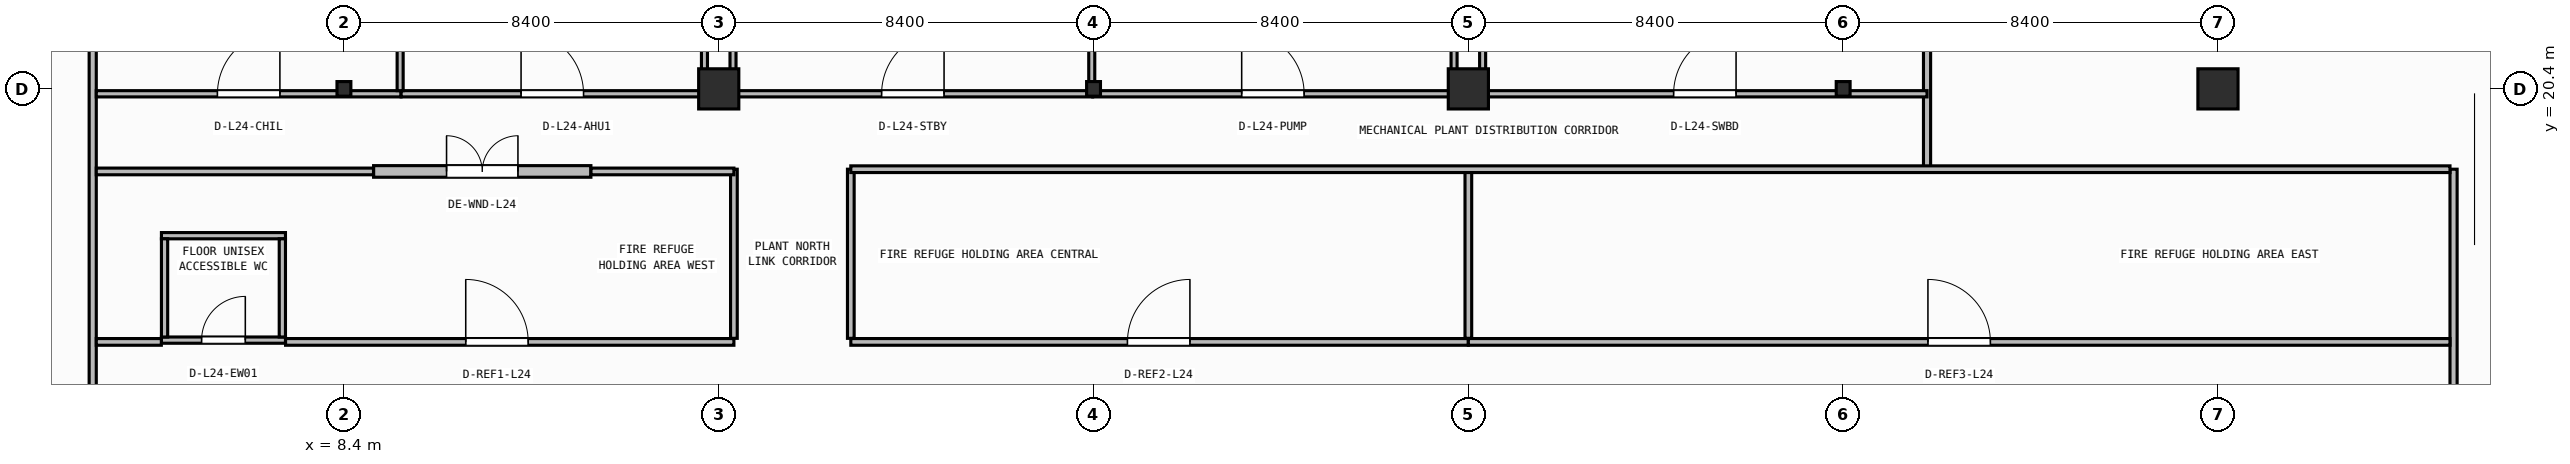
"""IFC4 building model, lengths in metres.
Left out: names, types, materials, properties, quantities, classifications, styles, units other than length and angle.
Written with IfcOpenShell. Run it as: python <this file> out.ifc"""

import sys

from ifc_helpers import new_model, si_unit, direction, frame, frame_2d, origin, origin_2d, place, context, subcontext, project, spatial, rectangle, i_section, extrude, element, fill, save


model = new_model("IFC4")
c1 = context("Model", 3, precision=1e-05, world=origin(), true_north=direction((0.0, 1.0)))
c2 = subcontext(c1, "Body", "Model", "MODEL_VIEW")
j1 = project(units=[si_unit("LENGTHUNIT", "METRE"), si_unit("PLANEANGLEUNIT", "RADIAN")], contexts=[c1])
p1 = place(None, origin())
s1 = spatial("IfcSite", under=j1, at=p1, CompositionType="ELEMENT")
p2 = place(p1, origin())
s2 = spatial("IfcBuilding", under=s1, at=p2, CompositionType="ELEMENT")
p3 = place(p2, frame((0.0, 0.0, 97.55)))
s3 = spatial("IfcBuildingStorey", under=s2, at=p3, CompositionType="ELEMENT", Elevation=97.55)
p4 = place(p3, frame((8.4, 20.4, 0.0), z_axis=(0.0, 0.0, 1.0), x_axis=(1.0, 0.0, 0.0)))
e1 = element("IfcColumn", 1, at=p4, inside=s3, PredefinedType="COLUMN", context=c2, shape_type="SweptSolid", body=[
    extrude(i_section(OverallWidth=0.311, OverallDepth=0.327, WebThickness=0.016, FlangeThickness=0.025, FilletRadius=0.017, at=origin_2d()), origin(), (0.0, 0.0, 1.0), 5.8),
])
p5 = place(p3, frame((16.8, 20.4, 0.0), z_axis=(0.0, 0.0, 1.0), x_axis=(1.0, 0.0, 0.0)))
e2 = element("IfcColumn", 2, at=p5, inside=s3, PredefinedType="COLUMN", context=c2, shape_type="SweptSolid", body=[
    extrude(rectangle(XDim=0.9, YDim=0.9, at=origin_2d()), origin(), (0.0, 0.0, 1.0), 5.8),
])
p6 = place(p3, frame((25.2, 20.4, 0.0), z_axis=(0.0, 0.0, 1.0), x_axis=(1.0, 0.0, 0.0)))
e3 = element("IfcColumn", 3, at=p6, inside=s3, PredefinedType="COLUMN", context=c2, shape_type="SweptSolid", body=[
    extrude(i_section(OverallWidth=0.311, OverallDepth=0.327, WebThickness=0.016, FlangeThickness=0.025, FilletRadius=0.017, at=origin_2d()), origin(), (0.0, 0.0, 1.0), 5.8),
])
p7 = place(p3, frame((33.6, 20.4, 0.0), z_axis=(0.0, 0.0, 1.0), x_axis=(1.0, 0.0, 0.0)))
e4 = element("IfcColumn", 4, at=p7, inside=s3, PredefinedType="COLUMN", context=c2, shape_type="SweptSolid", body=[
    extrude(rectangle(XDim=0.9, YDim=0.9, at=origin_2d()), origin(), (0.0, 0.0, 1.0), 5.8),
])
p8 = place(p3, frame((42.0, 20.4, 0.0), z_axis=(0.0, 0.0, 1.0), x_axis=(1.0, 0.0, 0.0)))
e5 = element("IfcColumn", 5, at=p8, inside=s3, PredefinedType="COLUMN", context=c2, shape_type="SweptSolid", body=[
    extrude(i_section(OverallWidth=0.311, OverallDepth=0.327, WebThickness=0.016, FlangeThickness=0.025, FilletRadius=0.017, at=origin_2d()), origin(), (0.0, 0.0, 1.0), 5.8),
])
p9 = place(p3, frame((50.4, 20.4, 0.0), z_axis=(0.0, 0.0, 1.0), x_axis=(1.0, 0.0, 0.0)))
e6 = element("IfcColumn", 6, at=p9, inside=s3, PredefinedType="COLUMN", context=c2, shape_type="SweptSolid", body=[
    extrude(rectangle(XDim=0.9, YDim=0.9, at=origin_2d()), origin(), (0.0, 0.0, 1.0), 5.8),
])
p10 = place(p3, frame((9.065, 18.55, 0.0), z_axis=(0.0, 0.0, 1.0), x_axis=(1.0, 0.0, 0.0)))
e7 = element("IfcWall", 7, at=p10, inside=s3, PredefinedType="STANDARD", context=c2, shape_type="SweptSolid", body=[
    extrude(rectangle(XDim=4.87, YDim=0.26, at=frame_2d((2.435, 0.0))), origin(), (0.0, 0.0, 1.0), 5.56),
])
p11 = place(p10, frame((1.635, 0.0, 0.0)))
e8 = element("IfcOpeningElement", 8, at=p11, cuts=e7, PredefinedType="OPENING", context=c2, shape_type="SweptSolid", body=[
    extrude(rectangle(XDim=1.6, YDim=2.2, at=frame_2d((0.8, 1.1))), frame((0.0, 0.14, 0.0), z_axis=(0.0, -1.0, 0.0), x_axis=(1.0, 0.0, 0.0)), (0.0, 0.0, 1.0), 0.28),
])
p12 = place(p3, frame((4.31, 14.77, 0.0), z_axis=(0.0, 0.0, 1.0), x_axis=(1.0, 0.0, 0.0)))
e9 = element("IfcWall", 9, at=p12, inside=s3, PredefinedType="PARTITIONING", context=c2, shape_type="SweptSolid", body=[
    extrude(rectangle(XDim=2.78, YDim=0.14, at=frame_2d((1.39, 0.0))), origin(), (0.0, 0.0, 1.0), 5.56),
])
p13 = place(p12, frame((0.9, 0.0, 0.0)))
e10 = element("IfcOpeningElement", 10, at=p13, cuts=e9, PredefinedType="OPENING", context=c2, shape_type="SweptSolid", body=[
    extrude(rectangle(XDim=0.98, YDim=2.1, at=frame_2d((0.49, 1.05))), frame((0.0, 0.08, 0.0), z_axis=(0.0, -1.0, 0.0), x_axis=(1.0, 0.0, 0.0)), (0.0, 0.0, 1.0), 0.16),
])
p14 = place(p3, frame((4.31, 17.11, 0.0), z_axis=(0.0, 0.0, 1.0), x_axis=(1.0, 0.0, 0.0)))
e11 = element("IfcWall", 11, at=p14, inside=s3, PredefinedType="PARTITIONING", context=c2, shape_type="SweptSolid", body=[
    extrude(rectangle(XDim=2.78, YDim=0.14, at=frame_2d((1.39, 0.0))), origin(), (0.0, 0.0, 1.0), 5.56),
])
for number, where, z_axis, x_axis in (
    (12, (4.38, 14.84, 0.0), (0.0, 0.0, 1.0), (0.0, 1.0, 0.0)),
    (13, (7.02, 14.84, 0.0), (0.0, 0.0, 1.0), (0.0, 1.0, 0.0)),
):
    element("IfcWall", number, at=place(p3, frame(where, z_axis=z_axis, x_axis=x_axis)), inside=s3, PredefinedType="PARTITIONING", context=c2, shape_type="SweptSolid", body=[
        extrude(rectangle(XDim=2.2, YDim=0.14, at=frame_2d((1.1, 0.0))), origin(), (0.0, 0.0, 1.0), 5.56),
    ])
p15 = place(p3, frame((2.77, 12.16, 0.0), z_axis=(0.0, 0.0, 1.0), x_axis=(0.0, 1.0, 0.0)))
e14 = element("IfcWall", 14, at=p15, inside=s3, PredefinedType="PARTITIONING", context=c2, shape_type="SweptSolid", body=[
    extrude(rectangle(XDim=16.04, YDim=0.16, at=frame_2d((8.02, 0.0))), origin(), (0.0, 0.0, 1.0), 5.56),
])
p16 = place(p3, frame((43.88, 18.6, 0.0), z_axis=(0.0, 0.0, 1.0), x_axis=(0.0, 1.0, 0.0)))
e15 = element("IfcWall", 15, at=p16, inside=s3, PredefinedType="PARTITIONING", context=c2, shape_type="SweptSolid", body=[
    extrude(rectangle(XDim=9.6, YDim=0.16, at=frame_2d((4.8, 0.0))), origin(), (0.0, 0.0, 1.0), 5.56),
])
p17 = place(p3, frame((55.68, 12.16, 0.0), z_axis=(0.0, 0.0, 1.0), x_axis=(0.0, 1.0, 0.0)))
e16 = element("IfcWall", 16, at=p17, inside=s3, PredefinedType="PARTITIONING", context=c2, shape_type="SweptSolid", body=[
    extrude(rectangle(XDim=6.44, YDim=0.16, at=frame_2d((3.22, 0.0))), origin(), (0.0, 0.0, 1.0), 5.56),
])
p18 = place(p3, frame((2.85, 14.73, 0.0), z_axis=(0.0, 0.0, 1.0), x_axis=(1.0, 0.0, 0.0)))
e17 = element("IfcWall", 17, at=p18, inside=s3, PredefinedType="PARTITIONING", context=c2, shape_type="SweptSolid", body=[
    extrude(rectangle(XDim=1.458, YDim=0.15, at=frame_2d((0.729, 0.0))), origin(), (0.0, 0.0, 1.0), 5.56),
])
p19 = place(p3, frame((7.092, 14.73, 0.0), z_axis=(0.0, 0.0, 1.0), x_axis=(1.0, 0.0, 0.0)))
e18 = element("IfcWall", 18, at=p19, inside=s3, PredefinedType="PARTITIONING", context=c2, shape_type="SweptSolid", body=[
    extrude(rectangle(XDim=10.048, YDim=0.15, at=frame_2d((5.024, 0.0))), origin(), (0.0, 0.0, 1.0), 5.56),
])
p20 = place(p19, frame((4.038, 0.0, 0.0)))
e19 = element("IfcOpeningElement", 19, at=p20, cuts=e18, PredefinedType="OPENING", context=c2, shape_type="SweptSolid", body=[
    extrude(rectangle(XDim=1.4, YDim=2.15, at=frame_2d((0.7, 1.075))), frame((0.0, 0.085, 0.0), z_axis=(0.0, -1.0, 0.0), x_axis=(1.0, 0.0, 0.0)), (0.0, 0.0, 1.0), 0.17),
])
p21 = place(p3, frame((17.14, 14.81, 0.0), z_axis=(0.0, 0.0, 1.0), x_axis=(0.0, 1.0, 0.0)))
e20 = element("IfcWall", 20, at=p21, inside=s3, PredefinedType="PARTITIONING", context=c2, shape_type="SweptSolid", body=[
    extrude(rectangle(XDim=3.79, YDim=0.15, at=frame_2d((1.895, 0.0))), origin(), (0.0, 0.0, 1.0), 5.56),
])
p22 = place(p3, frame((2.85, 18.55, 0.0), z_axis=(0.0, 0.0, 1.0), x_axis=(1.0, 0.0, 0.0)))
e21 = element("IfcWall", 21, at=p22, inside=s3, PredefinedType="PARTITIONING", context=c2, shape_type="SweptSolid", body=[
    extrude(rectangle(XDim=6.213, YDim=0.15, at=frame_2d((3.106, 0.0))), origin(), (0.0, 0.0, 1.0), 5.56),
])
p23 = place(p3, frame((13.937, 18.55, 0.0), z_axis=(0.0, 0.0, 1.0), x_axis=(1.0, 0.0, 0.0)))
e22 = element("IfcWall", 22, at=p23, inside=s3, PredefinedType="PARTITIONING", context=c2, shape_type="SweptSolid", body=[
    extrude(rectangle(XDim=3.203, YDim=0.15, at=frame_2d((1.602, 0.0))), origin(), (0.0, 0.0, 1.0), 5.56),
])
p24 = place(p3, frame((19.76, 14.81, 0.0), z_axis=(0.0, 0.0, 1.0), x_axis=(0.0, 1.0, 0.0)))
e23 = element("IfcWall", 23, at=p24, inside=s3, PredefinedType="PARTITIONING", context=c2, shape_type="SweptSolid", body=[
    extrude(rectangle(XDim=3.79, YDim=0.15, at=frame_2d((1.895, 0.0))), origin(), (0.0, 0.0, 1.0), 5.56),
])
p25 = place(p3, frame((19.76, 14.73, 0.0), z_axis=(0.0, 0.0, 1.0), x_axis=(1.0, 0.0, 0.0)))
e24 = element("IfcWall", 24, at=p25, inside=s3, PredefinedType="PARTITIONING", context=c2, shape_type="SweptSolid", body=[
    extrude(rectangle(XDim=13.84, YDim=0.15, at=frame_2d((6.92, 0.0))), origin(), (0.0, 0.0, 1.0), 5.56),
])
p26 = place(p25, frame((6.2, 0.0, 0.0)))
e25 = element("IfcOpeningElement", 25, at=p26, cuts=e24, PredefinedType="OPENING", context=c2, shape_type="SweptSolid", body=[
    extrude(rectangle(XDim=1.4, YDim=2.15, at=frame_2d((0.7, 1.075))), frame((0.0, 0.085, 0.0), z_axis=(0.0, -1.0, 0.0), x_axis=(1.0, 0.0, 0.0)), (0.0, 0.0, 1.0), 0.17),
])
p27 = place(p3, frame((33.6, 14.81, 0.0), z_axis=(0.0, 0.0, 1.0), x_axis=(0.0, 1.0, 0.0)))
e26 = element("IfcWall", 26, at=p27, inside=s3, PredefinedType="PARTITIONING", context=c2, shape_type="SweptSolid", body=[
    extrude(rectangle(XDim=3.79, YDim=0.15, at=frame_2d((1.895, 0.0))), origin(), (0.0, 0.0, 1.0), 4.325),
])
p28 = place(p3, frame((33.6, 14.73, 0.0), z_axis=(0.0, 0.0, 1.0), x_axis=(1.0, 0.0, 0.0)))
e27 = element("IfcWall", 27, at=p28, inside=s3, PredefinedType="PARTITIONING", context=c2, shape_type="SweptSolid", body=[
    extrude(rectangle(XDim=22.0, YDim=0.15, at=frame_2d((11.0, 0.0))), origin(), (0.0, 0.0, 1.0), 5.56),
])
p29 = place(p28, frame((10.3, 0.0, 0.0)))
e28 = element("IfcOpeningElement", 28, at=p29, cuts=e27, PredefinedType="OPENING", context=c2, shape_type="SweptSolid", body=[
    extrude(rectangle(XDim=1.4, YDim=2.15, at=frame_2d((0.7, 1.075))), frame((0.0, 0.085, 0.0), z_axis=(0.0, -1.0, 0.0), x_axis=(1.0, 0.0, 0.0)), (0.0, 0.0, 1.0), 0.17),
])
p30 = place(p3, frame((19.76, 18.6, 0.0), z_axis=(0.0, 0.0, 1.0), x_axis=(1.0, 0.0, 0.0)))
e29 = element("IfcWall", 29, at=p30, inside=s3, PredefinedType="PARTITIONING", context=c2, shape_type="SweptSolid", body=[
    extrude(rectangle(XDim=35.84, YDim=0.15, at=frame_2d((17.92, 0.0))), origin(), (0.0, 0.0, 1.0), 5.56),
])
p31 = place(p3, frame((2.85, 20.29, 0.0), z_axis=(0.0, 0.0, 1.0), x_axis=(1.0, 0.0, 0.0)))
e30 = element("IfcWall", 30, at=p31, inside=s3, PredefinedType="PARTITIONING", context=c2, shape_type="SweptSolid", body=[
    extrude(rectangle(XDim=6.83, YDim=0.14, at=frame_2d((3.415, 0.0))), origin(), (0.0, 0.0, 1.0), 4.835),
])
p32 = place(p31, frame((2.715, 0.0, 0.0)))
e31 = element("IfcOpeningElement", 31, at=p32, cuts=e30, PredefinedType="OPENING", context=c2, shape_type="SweptSolid", body=[
    extrude(rectangle(XDim=1.4, YDim=2.15, at=frame_2d((0.7, 1.075))), frame((0.0, 0.08, 0.0), z_axis=(0.0, -1.0, 0.0), x_axis=(1.0, 0.0, 0.0)), (0.0, 0.0, 1.0), 0.16),
])
p33 = place(p3, frame((9.682, 20.29, 0.0), z_axis=(0.0, 0.0, 1.0), x_axis=(1.0, 0.0, 0.0)))
e32 = element("IfcWall", 32, at=p33, inside=s3, PredefinedType="PARTITIONING", context=c2, shape_type="SweptSolid", body=[
    extrude(rectangle(XDim=6.798, YDim=0.14, at=frame_2d((3.399, 0.0))), origin(), (0.0, 0.0, 1.0), 4.835),
])
p34 = place(p33, frame((2.688, 0.0, 0.0)))
e33 = element("IfcOpeningElement", 33, at=p34, cuts=e32, PredefinedType="OPENING", context=c2, shape_type="SweptSolid", body=[
    extrude(rectangle(XDim=1.4, YDim=2.15, at=frame_2d((0.7, 1.075))), frame((0.0, 0.08, 0.0), z_axis=(0.0, -1.0, 0.0), x_axis=(1.0, 0.0, 0.0)), (0.0, 0.0, 1.0), 0.16),
])
p35 = place(p3, frame((9.66, 20.36, 0.0), z_axis=(0.0, 0.0, 1.0), x_axis=(0.0, 1.0, 0.0)))
e34 = element("IfcWall", 34, at=p35, inside=s3, PredefinedType="PARTITIONING", context=c2, shape_type="SweptSolid", body=[
    extrude(rectangle(XDim=7.84, YDim=0.135, at=frame_2d((3.92, 0.0))), origin(), (0.0, 0.0, 1.0), 5.56),
])
p36 = place(p3, frame((16.48, 20.36, 0.0), z_axis=(0.0, 0.0, 1.0), x_axis=(0.0, 1.0, 0.0)))
e35 = element("IfcWall", 35, at=p36, inside=s3, PredefinedType="PARTITIONING", context=c2, shape_type="SweptSolid", body=[
    extrude(rectangle(XDim=7.84, YDim=0.135, at=frame_2d((3.92, 0.0))), origin(), (0.0, 0.0, 1.0), 4.325),
])
p37 = place(p3, frame((16.48, 20.29, 0.0), z_axis=(0.0, 0.0, 1.0), x_axis=(1.0, 0.0, 0.0)))
e36 = element("IfcWall", 36, at=p37, inside=s3, PredefinedType="PARTITIONING", context=c2, shape_type="SweptSolid", body=[
    extrude(rectangle(XDim=0.64, YDim=0.14, at=frame_2d((0.32, 0.0))), origin(), (0.0, 0.0, 1.0), 4.835),
])
p38 = place(p3, frame((17.12, 20.29, 0.0), z_axis=(0.0, 0.0, 1.0), x_axis=(1.0, 0.0, 0.0)))
e37 = element("IfcWall", 37, at=p38, inside=s3, PredefinedType="PARTITIONING", context=c2, shape_type="SweptSolid", body=[
    extrude(rectangle(XDim=8.06, YDim=0.14, at=frame_2d((4.03, 0.0))), origin(), (0.0, 0.0, 1.0), 4.835),
])
p39 = place(p38, frame((3.33, 0.0, 0.0)))
e38 = element("IfcOpeningElement", 38, at=p39, cuts=e37, PredefinedType="OPENING", context=c2, shape_type="SweptSolid", body=[
    extrude(rectangle(XDim=1.4, YDim=2.15, at=frame_2d((0.7, 1.075))), frame((0.0, 0.08, 0.0), z_axis=(0.0, -1.0, 0.0), x_axis=(1.0, 0.0, 0.0)), (0.0, 0.0, 1.0), 0.16),
])
p40 = place(p3, frame((17.12, 20.36, 0.0), z_axis=(0.0, 0.0, 1.0), x_axis=(0.0, 1.0, 0.0)))
e39 = element("IfcWall", 39, at=p40, inside=s3, PredefinedType="PARTITIONING", context=c2, shape_type="SweptSolid", body=[
    extrude(rectangle(XDim=7.84, YDim=0.135, at=frame_2d((3.92, 0.0))), origin(), (0.0, 0.0, 1.0), 4.325),
])
p41 = place(p3, frame((25.182, 20.29, 0.0), z_axis=(0.0, 0.0, 1.0), x_axis=(1.0, 0.0, 0.0)))
e40 = element("IfcWall", 40, at=p41, inside=s3, PredefinedType="PARTITIONING", context=c2, shape_type="SweptSolid", body=[
    extrude(rectangle(XDim=8.098, YDim=0.14, at=frame_2d((4.049, 0.0))), origin(), (0.0, 0.0, 1.0), 4.835),
])
p42 = place(p41, frame((3.338, 0.0, 0.0)))
e41 = element("IfcOpeningElement", 41, at=p42, cuts=e40, PredefinedType="OPENING", context=c2, shape_type="SweptSolid", body=[
    extrude(rectangle(XDim=1.4, YDim=2.15, at=frame_2d((0.7, 1.075))), frame((0.0, 0.08, 0.0), z_axis=(0.0, -1.0, 0.0), x_axis=(1.0, 0.0, 0.0)), (0.0, 0.0, 1.0), 0.16),
])
for number, where, z_axis, x_axis in (
    (42, (25.16, 20.36, 0.0), (0.0, 0.0, 1.0), (0.0, 1.0, 0.0)),
    (43, (33.28, 20.36, 0.0), (0.0, 0.0, 1.0), (0.0, 1.0, 0.0)),
):
    element("IfcWall", number, at=place(p3, frame(where, z_axis=z_axis, x_axis=x_axis)), inside=s3, PredefinedType="PARTITIONING", context=c2, shape_type="SweptSolid", body=[
        extrude(rectangle(XDim=7.84, YDim=0.135, at=frame_2d((3.92, 0.0))), origin(), (0.0, 0.0, 1.0), 4.325),
    ])
p43 = place(p3, frame((33.28, 20.29, 0.0), z_axis=(0.0, 0.0, 1.0), x_axis=(1.0, 0.0, 0.0)))
e44 = element("IfcWall", 44, at=p43, inside=s3, PredefinedType="PARTITIONING", context=c2, shape_type="SweptSolid", body=[
    extrude(rectangle(XDim=0.64, YDim=0.14, at=frame_2d((0.32, 0.0))), origin(), (0.0, 0.0, 1.0), 4.835),
])
p44 = place(p3, frame((33.92, 20.29, 0.0), z_axis=(0.0, 0.0, 1.0), x_axis=(1.0, 0.0, 0.0)))
e45 = element("IfcWall", 45, at=p44, inside=s3, PredefinedType="PARTITIONING", context=c2, shape_type="SweptSolid", body=[
    extrude(rectangle(XDim=9.96, YDim=0.14, at=frame_2d((4.98, 0.0))), origin(), (0.0, 0.0, 1.0), 4.835),
])
p45 = place(p44, frame((4.28, 0.0, 0.0)))
e46 = element("IfcOpeningElement", 46, at=p45, cuts=e45, PredefinedType="OPENING", context=c2, shape_type="SweptSolid", body=[
    extrude(rectangle(XDim=1.4, YDim=2.15, at=frame_2d((0.7, 1.075))), frame((0.0, 0.08, 0.0), z_axis=(0.0, -1.0, 0.0), x_axis=(1.0, 0.0, 0.0)), (0.0, 0.0, 1.0), 0.16),
])
p46 = place(p3, frame((33.92, 20.36, 0.0), z_axis=(0.0, 0.0, 1.0), x_axis=(0.0, 1.0, 0.0)))
e47 = element("IfcWall", 47, at=p46, inside=s3, PredefinedType="PARTITIONING", context=c2, shape_type="SweptSolid", body=[
    extrude(rectangle(XDim=7.84, YDim=0.135, at=frame_2d((3.92, 0.0))), origin(), (0.0, 0.0, 1.0), 4.325),
])
p47 = place(p11, origin())
e48 = element("IfcDoor", 48, at=p47, inside=s3, OperationType="DOUBLE_DOOR_SINGLE_SWING", PredefinedType="DOOR", context=c2, shape_type="SweptSolid", body=[
    extrude(rectangle(XDim=1.6, YDim=2.2, at=frame_2d((0.8, 1.1))), frame((0.0, 0.025, 0.0), z_axis=(0.0, -1.0, 0.0), x_axis=(1.0, 0.0, 0.0)), (0.0, 0.0, 1.0), 0.05),
])
fill(e8, e48)
p48 = place(p13, origin())
e49 = element("IfcDoor", 49, at=p48, inside=s3, OperationType="SINGLE_SWING_RIGHT", PredefinedType="DOOR", context=c2, shape_type="SweptSolid", body=[
    extrude(rectangle(XDim=0.98, YDim=2.1, at=frame_2d((0.49, 1.05))), frame((0.0, 0.025, 0.0), z_axis=(0.0, -1.0, 0.0), x_axis=(1.0, 0.0, 0.0)), (0.0, 0.0, 1.0), 0.05),
])
fill(e10, e49)
p49 = place(p20, origin())
e50 = element("IfcDoor", 50, at=p49, inside=s3, OperationType="SINGLE_SWING_LEFT", PredefinedType="DOOR", context=c2, shape_type="SweptSolid", body=[
    extrude(rectangle(XDim=1.4, YDim=2.15, at=frame_2d((0.7, 1.075))), frame((0.0, 0.025, 0.0), z_axis=(0.0, -1.0, 0.0), x_axis=(1.0, 0.0, 0.0)), (0.0, 0.0, 1.0), 0.05),
])
fill(e19, e50)
p50 = place(p26, origin())
e51 = element("IfcDoor", 51, at=p50, inside=s3, OperationType="SINGLE_SWING_RIGHT", PredefinedType="DOOR", context=c2, shape_type="SweptSolid", body=[
    extrude(rectangle(XDim=1.4, YDim=2.15, at=frame_2d((0.7, 1.075))), frame((0.0, 0.025, 0.0), z_axis=(0.0, -1.0, 0.0), x_axis=(1.0, 0.0, 0.0)), (0.0, 0.0, 1.0), 0.05),
])
fill(e25, e51)
p51 = place(p29, origin())
e52 = element("IfcDoor", 52, at=p51, inside=s3, OperationType="SINGLE_SWING_LEFT", PredefinedType="DOOR", context=c2, shape_type="SweptSolid", body=[
    extrude(rectangle(XDim=1.4, YDim=2.15, at=frame_2d((0.7, 1.075))), frame((0.0, 0.025, 0.0), z_axis=(0.0, -1.0, 0.0), x_axis=(1.0, 0.0, 0.0)), (0.0, 0.0, 1.0), 0.05),
])
fill(e28, e52)
p52 = place(p32, origin())
e53 = element("IfcDoor", 53, at=p52, inside=s3, OperationType="SINGLE_SWING_RIGHT", PredefinedType="DOOR", context=c2, shape_type="SweptSolid", body=[
    extrude(rectangle(XDim=1.4, YDim=2.15, at=frame_2d((0.7, 1.075))), frame((0.0, 0.025, 0.0), z_axis=(0.0, -1.0, 0.0), x_axis=(1.0, 0.0, 0.0)), (0.0, 0.0, 1.0), 0.05),
])
fill(e31, e53)
p53 = place(p34, origin())
e54 = element("IfcDoor", 54, at=p53, inside=s3, OperationType="SINGLE_SWING_LEFT", PredefinedType="DOOR", context=c2, shape_type="SweptSolid", body=[
    extrude(rectangle(XDim=1.4, YDim=2.15, at=frame_2d((0.7, 1.075))), frame((0.0, 0.025, 0.0), z_axis=(0.0, -1.0, 0.0), x_axis=(1.0, 0.0, 0.0)), (0.0, 0.0, 1.0), 0.05),
])
fill(e33, e54)
p54 = place(p39, origin())
e55 = element("IfcDoor", 55, at=p54, inside=s3, OperationType="SINGLE_SWING_RIGHT", PredefinedType="DOOR", context=c2, shape_type="SweptSolid", body=[
    extrude(rectangle(XDim=1.4, YDim=2.15, at=frame_2d((0.7, 1.075))), frame((0.0, 0.025, 0.0), z_axis=(0.0, -1.0, 0.0), x_axis=(1.0, 0.0, 0.0)), (0.0, 0.0, 1.0), 0.05),
])
fill(e38, e55)
p55 = place(p42, origin())
e56 = element("IfcDoor", 56, at=p55, inside=s3, OperationType="SINGLE_SWING_LEFT", PredefinedType="DOOR", context=c2, shape_type="SweptSolid", body=[
    extrude(rectangle(XDim=1.4, YDim=2.15, at=frame_2d((0.7, 1.075))), frame((0.0, 0.025, 0.0), z_axis=(0.0, -1.0, 0.0), x_axis=(1.0, 0.0, 0.0)), (0.0, 0.0, 1.0), 0.05),
])
fill(e41, e56)
p56 = place(p45, origin())
e57 = element("IfcDoor", 57, at=p56, inside=s3, OperationType="SINGLE_SWING_RIGHT", PredefinedType="DOOR", context=c2, shape_type="SweptSolid", body=[
    extrude(rectangle(XDim=1.4, YDim=2.15, at=frame_2d((0.7, 1.075))), frame((0.0, 0.025, 0.0), z_axis=(0.0, -1.0, 0.0), x_axis=(1.0, 0.0, 0.0)), (0.0, 0.0, 1.0), 0.05),
])
fill(e46, e57)
save(model, sys.argv[1])
